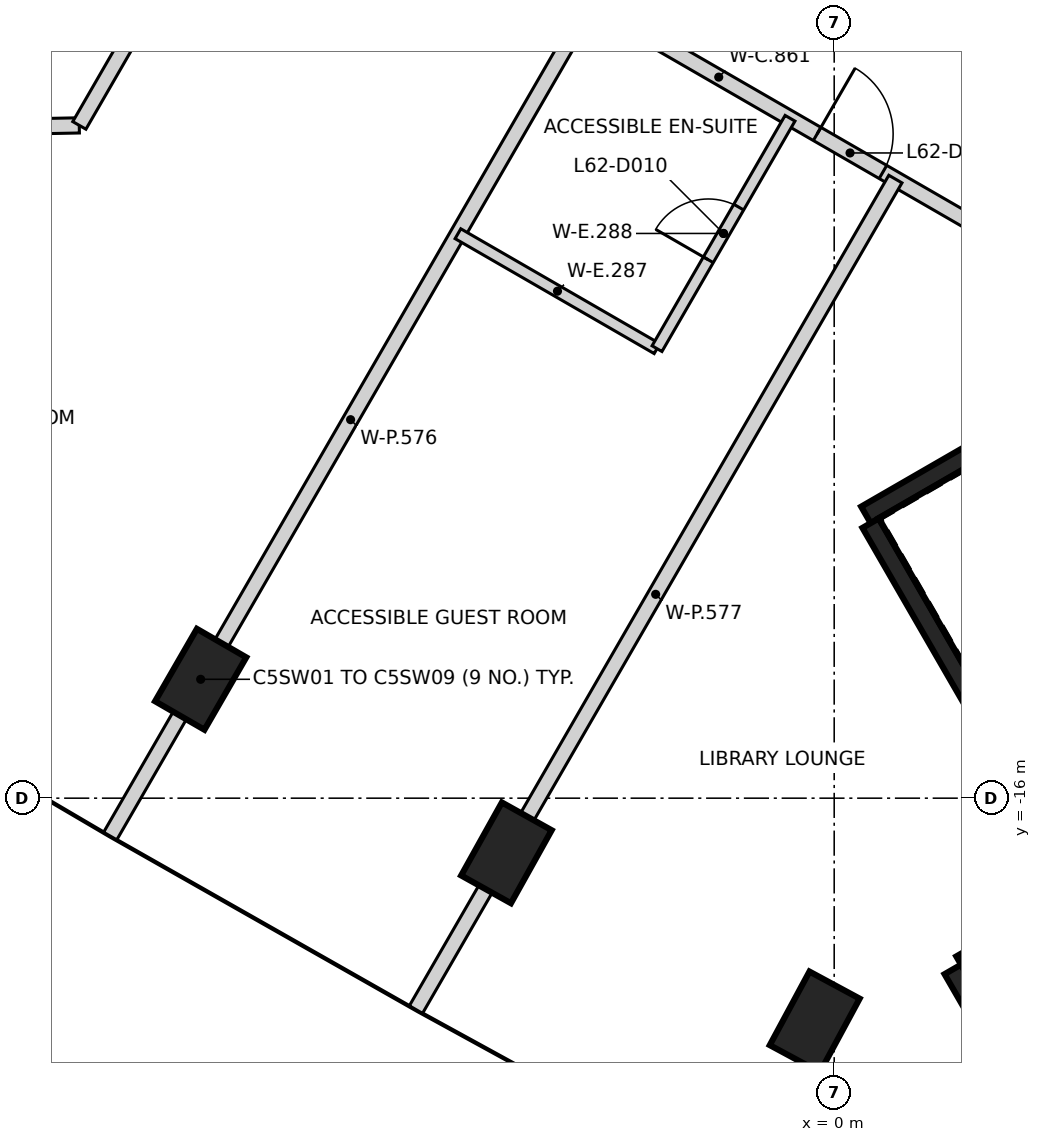
"""IFC4 building model, lengths in metres.
Left out: names, types, materials, properties, quantities, classifications, styles, units other than length and angle.
Written with IfcOpenShell. Run it as: python <this file> out.ifc"""

import sys

from ifc_helpers import new_model, si_unit, direction, frame, frame_2d, origin, origin_2d, place, context, subcontext, project, spatial, rectangle, extrude, element, fill, save


model = new_model("IFC4")
c1 = context("Model", 3, precision=1e-05, world=origin(), true_north=direction((0.0, 1.0)))
c2 = subcontext(c1, "Body", "Model", "MODEL_VIEW")
j1 = project(units=[si_unit("LENGTHUNIT", "METRE"), si_unit("PLANEANGLEUNIT", "RADIAN")], contexts=[c1])
p1 = place(None, origin())
s1 = spatial("IfcSite", under=j1, at=p1, CompositionType="ELEMENT")
p2 = place(p1, origin())
s2 = spatial("IfcBuilding", under=s1, at=p2, CompositionType="ELEMENT")
p3 = place(p2, frame((0.0, 0.0, 246.6)))
s3 = spatial("IfcBuildingStorey", under=s2, at=p3, CompositionType="ELEMENT", Elevation=246.6)
for number, where, z_axis, x_axis in (
    (1, (-8.335, -14.436, -0.35), (0.0, 0.0, 1.0), (0.5, 0.866, 0.0)),
    (2, (-4.312, -16.719, -0.35), (0.0, 0.0, 1.0), (0.487, 0.873, 0.0)),
    (3, (-0.256, -18.943, -0.35), (0.0, 0.0, 1.0), (0.475, 0.88, 0.0)),
):
    element("IfcColumn", number, at=place(p3, frame(where, z_axis=z_axis, x_axis=x_axis)), inside=s3, PredefinedType="COLUMN", context=c2, shape_type="SweptSolid", body=[
        extrude(rectangle(XDim=1.1, YDim=0.75, at=origin_2d()), origin(), (0.0, 0.0, 1.0), 3.6),
    ])
p4 = place(p3, frame((0.417, -12.273, 0.0), z_axis=(0.0, 0.0, 1.0), x_axis=(0.866021906294, 0.500006057782, 0.0)))
e4 = element("IfcWall", 4, at=p4, inside=s3, PredefinedType="SHEAR", context=c2, shape_type="SweptSolid", body=[
    extrude(rectangle(XDim=11.55, YDim=0.25, at=frame_2d((5.775, 0.0))), origin(), (0.0, 0.0, 1.0), 3.25),
])
p5 = place(p4, frame((10.025, 0.0, 0.0)))
e5 = element("IfcOpeningElement", 5, at=p5, cuts=e4, PredefinedType="OPENING", context=c2, shape_type="SweptSolid", body=[
    extrude(rectangle(XDim=1.2, YDim=2.1, at=frame_2d((0.6, 1.05))), frame((0.0, 0.135, 0.0), z_axis=(0.0, -1.0, 0.0), x_axis=(1.0, 0.0, 0.0)), (0.0, 0.0, 1.0), 0.27),
])
p6 = place(p4, frame((8.725, 0.0, 0.0)))
e6 = element("IfcOpeningElement", 6, at=p6, cuts=e4, PredefinedType="OPENING", context=c2, shape_type="SweptSolid", body=[
    extrude(rectangle(XDim=1.2, YDim=2.1, at=frame_2d((0.6, 1.05))), frame((0.0, 0.135, 0.0), z_axis=(0.0, -1.0, 0.0), x_axis=(1.0, 0.0, 0.0)), (0.0, 0.0, 1.0), 0.27),
])
p7 = place(p3, frame((3.235, -17.153, 0.0), z_axis=(0.0, 0.0, 1.0), x_axis=(-0.500008851346, 0.866020293397, 0.0)))
e7 = element("IfcWall", 7, at=p7, inside=s3, PredefinedType="SHEAR", context=c2, shape_type="SweptSolid", body=[
    extrude(rectangle(XDim=5.51, YDim=0.25, at=frame_2d((2.755, 0.0))), origin(), (0.0, 0.0, 1.0), 3.25),
])
p8 = place(p3, frame((3.217, -21.122, 0.0), z_axis=(0.0, 0.0, 1.0), x_axis=(-0.499998874531, 0.866026053573, 0.0)))
e8 = element("IfcWall", 8, at=p8, inside=s3, PredefinedType="SHEAR", context=c2, shape_type="SweptSolid", body=[
    extrude(rectangle(XDim=3.313, YDim=0.25, at=frame_2d((1.656, 0.0))), origin(), (0.0, 0.0, 1.0), 3.25),
])
p9 = place(p3, frame((1.669, -18.19, 0.0), z_axis=(0.0, 0.0, 1.0), x_axis=(0.866042235819, 0.499970844928, 0.0)))
e9 = element("IfcWall", 9, at=p9, inside=s3, PredefinedType="SHEAR", context=c2, shape_type="SweptSolid", body=[
    extrude(rectangle(XDim=2.865, YDim=0.25, at=frame_2d((1.432, 0.0))), origin(), (0.0, 0.0, 1.0), 3.25),
])
p10 = place(p3, frame((-19.149, -7.329, 0.0), z_axis=(0.0, 0.0, 1.0), x_axis=(0.999808990333, 0.019544381503, 0.0)))
e10 = element("IfcWall", 10, at=p10, inside=s3, PredefinedType="PARTITIONING", context=c2, shape_type="SweptSolid", body=[
    extrude(rectangle(XDim=9.219, YDim=0.2, at=frame_2d((4.609, 0.0))), origin(), (0.0, 0.0, 1.0), 3.25),
])
p11 = place(p10, frame((1.649, 0.0, 0.0)))
e11 = element("IfcOpeningElement", 11, at=p11, cuts=e10, PredefinedType="OPENING", context=c2, shape_type="SweptSolid", body=[
    extrude(rectangle(XDim=1.0, YDim=2.1, at=frame_2d((0.5, 1.05))), frame((0.0, 0.11, 0.0), z_axis=(0.0, -1.0, 0.0), x_axis=(1.0, 0.0, 0.0)), (0.0, 0.0, 1.0), 0.22),
])
p12 = place(p10, frame((6.245, 0.0, 0.0)))
e12 = element("IfcOpeningElement", 12, at=p12, cuts=e10, PredefinedType="OPENING", context=c2, shape_type="SweptSolid", body=[
    extrude(rectangle(XDim=1.0, YDim=2.1, at=frame_2d((0.5, 1.05))), frame((0.0, 0.11, 0.0), z_axis=(0.0, -1.0, 0.0), x_axis=(1.0, 0.0, 0.0)), (0.0, 0.0, 1.0), 0.22),
])
p13 = place(p3, frame((-9.931, -7.149, 0.0), z_axis=(0.0, 0.0, 1.0), x_axis=(0.499829760107, 0.866123669525, 0.0)))
e13 = element("IfcWall", 13, at=p13, inside=s3, PredefinedType="PARTITIONING", context=c2, shape_type="SweptSolid", body=[
    extrude(rectangle(XDim=2.889, YDim=0.2, at=frame_2d((1.444, 0.0))), origin(), (0.0, 0.0, 1.0), 3.25),
])
p14 = place(p3, frame((-7.289, -3.182, 0.0), z_axis=(0.0, 0.0, 1.0), x_axis=(0.865979329032, -0.500079795322, 0.0)))
e14 = element("IfcWall", 14, at=p14, inside=s3, PredefinedType="PARTITIONING", context=c2, shape_type="SweptSolid", body=[
    extrude(rectangle(XDim=13.326, YDim=0.2, at=frame_2d((6.663, 0.0))), origin(), (0.0, 0.0, 1.0), 3.25),
])
p15 = place(p14, frame((8.158, 0.0, 0.0)))
e15 = element("IfcOpeningElement", 15, at=p15, cuts=e14, PredefinedType="OPENING", context=c2, shape_type="SweptSolid", body=[
    extrude(rectangle(XDim=1.0, YDim=2.1, at=frame_2d((0.5, 1.05))), frame((0.0, 0.11, 0.0), z_axis=(0.0, -1.0, 0.0), x_axis=(1.0, 0.0, 0.0)), (0.0, 0.0, 1.0), 0.22),
])
p16 = place(p14, frame((10.865, 0.0, 0.0)))
e16 = element("IfcOpeningElement", 16, at=p16, cuts=e14, PredefinedType="OPENING", context=c2, shape_type="SweptSolid", body=[
    extrude(rectangle(XDim=1.0, YDim=2.1, at=frame_2d((0.5, 1.05))), frame((0.0, 0.11, 0.0), z_axis=(0.0, -1.0, 0.0), x_axis=(1.0, 0.0, 0.0)), (0.0, 0.0, 1.0), 0.22),
])
p17 = place(p3, frame((-9.525, -16.498, 0.0), z_axis=(0.0, 0.0, 1.0), x_axis=(0.500002007972, 0.866024244478, 0.0)))
e17 = element("IfcWall", 17, at=p17, inside=s3, PredefinedType="PARTITIONING", context=c2, shape_type="SweptSolid", body=[
    extrude(rectangle(XDim=12.65, YDim=0.2, at=frame_2d((6.325, 0.0))), origin(), (0.0, 0.0, 1.0), 3.25),
])
p18 = place(p3, frame((-5.503, -18.781, 0.0), z_axis=(0.0, 0.0, 1.0), x_axis=(0.499968699423, 0.866043474427, 0.0)))
e18 = element("IfcWall", 18, at=p18, inside=s3, PredefinedType="PARTITIONING", context=c2, shape_type="SweptSolid", body=[
    extrude(rectangle(XDim=12.616, YDim=0.2, at=frame_2d((6.308, 0.0))), origin(), (0.0, 0.0, 1.0), 3.25),
])
p19 = place(p3, frame((-4.95, -8.574, 0.0), z_axis=(0.0, 0.0, 1.0), x_axis=(0.866033665757, -0.499985689571, 0.0)))
e19 = element("IfcWall", 19, at=p19, inside=s3, PredefinedType="PARTITIONING", context=c2, shape_type="SweptSolid", body=[
    extrude(rectangle(XDim=3.024, YDim=0.15, at=frame_2d((1.512, 0.0))), origin(), (0.0, 0.0, 1.0), 3.25),
])
p20 = place(p3, frame((-2.331, -10.086, 0.0), z_axis=(0.0, 0.0, 1.0), x_axis=(0.500010275428, 0.866019471182, 0.0)))
e20 = element("IfcWall", 20, at=p20, inside=s3, PredefinedType="PARTITIONING", context=c2, shape_type="SweptSolid", body=[
    extrude(rectangle(XDim=3.5, YDim=0.15, at=frame_2d((1.75, 0.0))), origin(), (0.0, 0.0, 1.0), 3.25),
])
p21 = place(p20, frame((1.35, 0.0, 0.0)))
e21 = element("IfcOpeningElement", 21, at=p21, cuts=e20, PredefinedType="OPENING", context=c2, shape_type="SweptSolid", body=[
    extrude(rectangle(XDim=0.8, YDim=2.1, at=frame_2d((0.4, 1.05))), frame((0.0, 0.085, 0.0), z_axis=(0.0, -1.0, 0.0), x_axis=(1.0, 0.0, 0.0)), (0.0, 0.0, 1.0), 0.17),
])
p22 = place(p15, frame((1.0, 0.0, 0.0), z_axis=(0.0, 0.0, 1.0), x_axis=(-1.0, 0.0, 0.0)))
e22 = element("IfcDoor", 22, at=p22, inside=s3, OperationType="SINGLE_SWING_LEFT", PredefinedType="DOOR", context=c2, shape_type="SweptSolid", body=[
    extrude(rectangle(XDim=1.0, YDim=2.1, at=frame_2d((0.5, 1.05))), frame((0.0, 0.025, 0.0), z_axis=(0.0, -1.0, 0.0), x_axis=(1.0, 0.0, 0.0)), (0.0, 0.0, 1.0), 0.05),
])
fill(e15, e22)
p23 = place(p21, origin())
e23 = element("IfcDoor", 23, at=p23, inside=s3, OperationType="SINGLE_SWING_LEFT", PredefinedType="DOOR", context=c2, shape_type="SweptSolid", body=[
    extrude(rectangle(XDim=0.8, YDim=2.1, at=frame_2d((0.4, 1.05))), frame((0.0, 0.025, 0.0), z_axis=(0.0, -1.0, 0.0), x_axis=(1.0, 0.0, 0.0)), (0.0, 0.0, 1.0), 0.05),
])
fill(e21, e23)
save(model, sys.argv[1])
